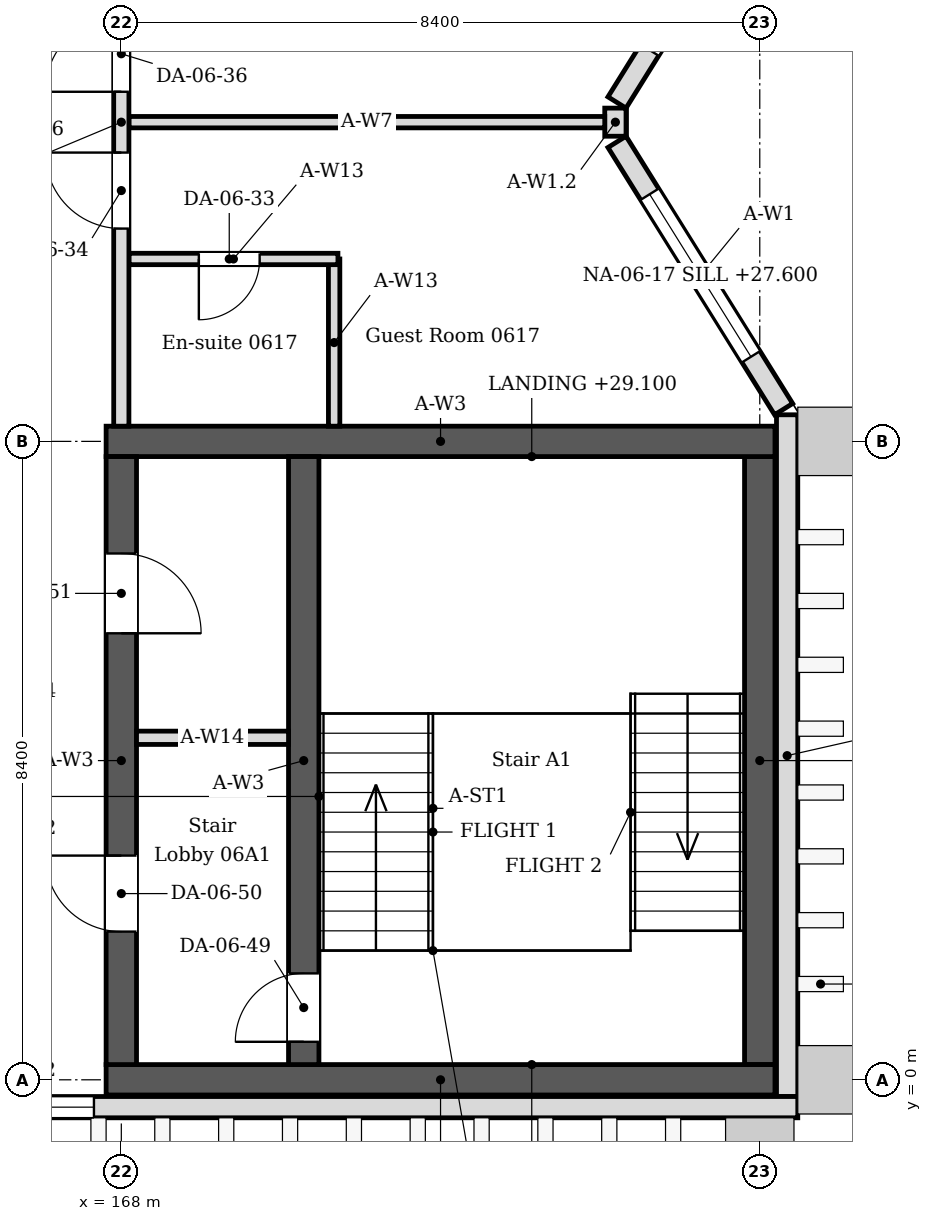
"""IFC4 building model, lengths in metres.
Left out: names, types, materials, properties, quantities, classifications, styles, units other than length and angle.
Written with IfcOpenShell. Run it as: python <this file> out.ifc"""

import sys

from ifc_helpers import new_model, si_unit, direction, frame, frame_2d, origin, place, context, subcontext, project, spatial, rectangle, extrude, element, fill, save


model = new_model("IFC4")
c1 = context("Model", 3, precision=1e-05, world=origin(), true_north=direction((0.0, 1.0)))
c2 = subcontext(c1, "Body", "Model", "MODEL_VIEW")
j1 = project(units=[si_unit("LENGTHUNIT", "METRE"), si_unit("PLANEANGLEUNIT", "RADIAN")], contexts=[c1])
p1 = place(None, origin())
s1 = spatial("IfcSite", under=j1, at=p1, CompositionType="ELEMENT")
p2 = place(p1, origin())
s2 = spatial("IfcBuilding", under=s1, at=p2, CompositionType="ELEMENT")
p3 = place(p2, frame((0.0, 0.0, 27.0)))
s3 = spatial("IfcBuildingStorey", under=s2, at=p3, CompositionType="ELEMENT", Elevation=27.0)
for number, where, z_axis, x_axis in (
    (1, (167.8, 0.0, 0.0), (0.0, 0.0, 1.0), (1.0, 0.0, 0.0)),
    (2, (167.8, 8.4, 0.0), (0.0, 0.0, 1.0), (1.0, 0.0, 0.0)),
):
    element("IfcWall", number, at=place(p3, frame(where, z_axis=z_axis, x_axis=x_axis)), inside=s3, PredefinedType="SOLIDWALL", context=c2, shape_type="SweptSolid", body=[
        extrude(rectangle(XDim=8.8, YDim=0.4, at=frame_2d((4.4, 0.0))), origin(), (0.0, 0.0, 1.0), 4.05),
    ])
p4 = place(p3, frame((168.0, 0.2, 0.0), z_axis=(0.0, 0.0, 1.0), x_axis=(0.0, 1.0, 0.0)))
e3 = element("IfcWall", 3, at=p4, inside=s3, PredefinedType="SOLIDWALL", context=c2, shape_type="SweptSolid", body=[
    extrude(rectangle(XDim=8.0, YDim=0.4, at=frame_2d((4.0, 0.0))), origin(), (0.0, 0.0, 1.0), 4.05),
])
p5 = place(p4, frame((1.75, 0.0, 0.0)))
e4 = element("IfcOpeningElement", 4, at=p5, cuts=e3, PredefinedType="OPENING", context=c2, shape_type="SweptSolid", body=[
    extrude(rectangle(XDim=1.0, YDim=2.1, at=frame_2d((0.5, 1.05))), frame((0.0, 0.21, 0.0), z_axis=(0.0, -1.0, 0.0), x_axis=(1.0, 0.0, 0.0)), (0.0, 0.0, 1.0), 0.42),
])
p6 = place(p4, frame((5.675, 0.0, 0.0)))
e5 = element("IfcOpeningElement", 5, at=p6, cuts=e3, PredefinedType="OPENING", context=c2, shape_type="SweptSolid", body=[
    extrude(rectangle(XDim=1.05, YDim=2.1, at=frame_2d((0.525, 1.05))), frame((0.0, 0.21, 0.0), z_axis=(0.0, -1.0, 0.0), x_axis=(1.0, 0.0, 0.0)), (0.0, 0.0, 1.0), 0.42),
])
p7 = place(p3, frame((176.4, 0.2, 0.0), z_axis=(0.0, 0.0, 1.0), x_axis=(0.0, 1.0, 0.0)))
e6 = element("IfcWall", 6, at=p7, inside=s3, PredefinedType="SOLIDWALL", context=c2, shape_type="SweptSolid", body=[
    extrude(rectangle(XDim=8.0, YDim=0.4, at=frame_2d((4.0, 0.0))), origin(), (0.0, 0.0, 1.0), 4.05),
])
p8 = place(p3, frame((176.76, -0.22, 0.0), z_axis=(0.0, 0.0, 1.0), x_axis=(0.0, 1.0, 0.0)))
e7 = element("IfcWall", 7, at=p8, inside=s3, PredefinedType="SOLIDWALL", context=c2, shape_type="SweptSolid", body=[
    extrude(rectangle(XDim=8.97, YDim=0.28, at=frame_2d((4.485, 0.0))), origin(), (0.0, 0.0, 1.0), 4.05),
])
p9 = place(p3, frame((176.714, 8.824, 0.0), z_axis=(0.0, 0.0, 1.0), x_axis=(-0.529018946142, 0.848610013271, 0.0)))
e8 = element("IfcWall", 8, at=p9, inside=s3, PredefinedType="SOLIDWALL", context=c2, shape_type="SweptSolid", body=[
    extrude(rectangle(XDim=4.144, YDim=0.28, at=frame_2d((2.072, 0.0))), origin(), (0.0, 0.0, 1.0), 4.05),
])
p10 = place(p9, frame((0.812, 0.0, 0.6)))
e9 = element("IfcOpeningElement", 9, at=p10, cuts=e8, PredefinedType="OPENING", context=c2, shape_type="SweptSolid", body=[
    extrude(rectangle(XDim=2.52, YDim=2.4, at=frame_2d((1.26, 1.2))), frame((0.0, 0.15, 0.0), z_axis=(0.0, -1.0, 0.0), x_axis=(1.0, 0.0, 0.0)), (0.0, 0.0, 1.0), 0.3),
])
p11 = place(p3, frame((174.521, 12.859, 0.0), z_axis=(0.0, 0.0, 1.0), x_axis=(0.528992500338, 0.848626498871, 0.0)))
e10 = element("IfcWall", 10, at=p11, inside=s3, PredefinedType="SOLIDWALL", context=c2, shape_type="SweptSolid", body=[
    extrude(rectangle(XDim=4.145, YDim=0.28, at=frame_2d((2.072, 0.0))), origin(), (0.0, 0.0, 1.0), 4.05),
])
p12 = place(p11, frame((0.812, 0.0, 0.6)))
e11 = element("IfcOpeningElement", 11, at=p12, cuts=e10, PredefinedType="OPENING", context=c2, shape_type="SweptSolid", body=[
    extrude(rectangle(XDim=2.52, YDim=2.4, at=frame_2d((1.26, 1.2))), frame((0.0, 0.15, 0.0), z_axis=(0.0, -1.0, 0.0), x_axis=(1.0, 0.0, 0.0)), (0.0, 0.0, 1.0), 0.3),
])
p13 = place(p3, frame((174.5, 12.415, 0.0), z_axis=(0.0, 0.0, 1.0), x_axis=(0.0, 1.0, 0.0)))
e12 = element("IfcWall", 12, at=p13, inside=s3, PredefinedType="SOLIDWALL", context=c2, shape_type="SweptSolid", body=[
    extrude(rectangle(XDim=0.37, YDim=0.28, at=frame_2d((0.185, 0.0))), origin(), (0.0, 0.0, 1.0), 3.604),
])
p14 = place(p3, frame((156.7, -0.36, 0.0), z_axis=(0.0, 0.0, 1.0), x_axis=(1.0, 0.0, 0.0)))
e13 = element("IfcWall", 13, at=p14, inside=s3, PredefinedType="SOLIDWALL", context=c2, shape_type="SweptSolid", body=[
    extrude(rectangle(XDim=20.2, YDim=0.28, at=frame_2d((10.1, 0.0))), origin(), (0.0, 0.0, 1.0), 4.05),
])
p15 = place(p14, frame((9.26, 0.0, 0.6)))
e14 = element("IfcOpeningElement", 14, at=p15, cuts=e13, PredefinedType="OPENING", context=c2, shape_type="SweptSolid", body=[
    extrude(rectangle(XDim=1.68, YDim=2.4, at=frame_2d((0.84, 1.2))), frame((0.0, 0.15, 0.0), z_axis=(0.0, -1.0, 0.0), x_axis=(1.0, 0.0, 0.0)), (0.0, 0.0, 1.0), 0.3),
])
p16 = place(p14, frame((3.34, 0.0, 0.6)))
e15 = element("IfcOpeningElement", 15, at=p16, cuts=e13, PredefinedType="OPENING", context=c2, shape_type="SweptSolid", body=[
    extrude(rectangle(XDim=2.52, YDim=2.4, at=frame_2d((1.26, 1.2))), frame((0.0, 0.15, 0.0), z_axis=(0.0, -1.0, 0.0), x_axis=(1.0, 0.0, 0.0)), (0.0, 0.0, 1.0), 0.3),
])
p17 = place(p3, frame((170.8, 8.6, 0.0), z_axis=(0.0, 0.0, 1.0), x_axis=(0.0, 1.0, 0.0)))
e16 = element("IfcWall", 16, at=p17, inside=s3, PredefinedType="PARTITIONING", context=c2, shape_type="SweptSolid", body=[
    extrude(rectangle(XDim=2.2, YDim=0.15, at=frame_2d((1.1, 0.0))), origin(), (0.0, 0.0, 1.0), 4.05),
])
p18 = place(p3, frame((170.85, 10.8, 0.0), z_axis=(0.0, 0.0, 1.0), x_axis=(-1.0, 0.0, 0.0)))
e17 = element("IfcWall", 17, at=p18, inside=s3, PredefinedType="PARTITIONING", context=c2, shape_type="SweptSolid", body=[
    extrude(rectangle(XDim=2.75, YDim=0.15, at=frame_2d((1.375, 0.0))), origin(), (0.0, 0.0, 1.0), 4.05),
])
p19 = place(p18, frame((1.03, 0.0, 0.0)))
e18 = element("IfcOpeningElement", 18, at=p19, cuts=e17, PredefinedType="OPENING", context=c2, shape_type="SweptSolid", body=[
    extrude(rectangle(XDim=0.8, YDim=2.1, at=frame_2d((0.4, 1.05))), frame((0.0, 0.085, 0.0), z_axis=(0.0, -1.0, 0.0), x_axis=(1.0, 0.0, 0.0)), (0.0, 0.0, 1.0), 0.17),
])
p20 = place(p3, frame((168.1, 12.6, 0.0), z_axis=(0.0, 0.0, 1.0), x_axis=(1.0, 0.0, 0.0)))
e19 = element("IfcWall", 19, at=p20, inside=s3, PredefinedType="PARTITIONING", context=c2, shape_type="SweptSolid", body=[
    extrude(rectangle(XDim=6.26, YDim=0.15, at=frame_2d((3.13, 0.0))), origin(), (0.0, 0.0, 1.0), 3.604),
])
p21 = place(p3, frame((168.0, 8.6, 0.0), z_axis=(0.0, 0.0, 1.0), x_axis=(0.0, 1.0, 0.0)))
e20 = element("IfcWall", 20, at=p21, inside=s3, PredefinedType="PARTITIONING", context=c2, shape_type="SweptSolid", body=[
    extrude(rectangle(XDim=8.0, YDim=0.2, at=frame_2d((4.0, 0.0))), origin(), (0.0, 0.0, 1.0), 3.45),
])
p22 = place(p21, frame((2.6, 0.0, 0.0)))
e21 = element("IfcOpeningElement", 21, at=p22, cuts=e20, PredefinedType="OPENING", context=c2, shape_type="SweptSolid", body=[
    extrude(rectangle(XDim=1.0, YDim=2.4, at=frame_2d((0.5, 1.2))), frame((0.0, 0.11, 0.0), z_axis=(0.0, -1.0, 0.0), x_axis=(1.0, 0.0, 0.0)), (0.0, 0.0, 1.0), 0.22),
])
p23 = place(p21, frame((4.4, 0.0, 0.0)))
e22 = element("IfcOpeningElement", 22, at=p23, cuts=e20, PredefinedType="OPENING", context=c2, shape_type="SweptSolid", body=[
    extrude(rectangle(XDim=1.0, YDim=2.4, at=frame_2d((0.5, 1.2))), frame((0.0, 0.11, 0.0), z_axis=(0.0, -1.0, 0.0), x_axis=(1.0, 0.0, 0.0)), (0.0, 0.0, 1.0), 0.22),
])
p24 = place(p3, frame((170.4, 0.2, 0.0), z_axis=(0.0, 0.0, 1.0), x_axis=(0.0, 1.0, 0.0)))
e23 = element("IfcWall", 23, at=p24, inside=s3, PredefinedType="SOLIDWALL", context=c2, shape_type="SweptSolid", body=[
    extrude(rectangle(XDim=8.0, YDim=0.4, at=frame_2d((4.0, 0.0))), origin(), (0.0, 0.0, 1.0), 4.05),
])
p25 = place(p24, frame((0.3, 0.0, 0.0)))
e24 = element("IfcOpeningElement", 24, at=p25, cuts=e23, PredefinedType="OPENING", context=c2, shape_type="SweptSolid", body=[
    extrude(rectangle(XDim=0.9, YDim=2.1, at=frame_2d((0.45, 1.05))), frame((0.0, 0.21, 0.0), z_axis=(0.0, -1.0, 0.0), x_axis=(1.0, 0.0, 0.0)), (0.0, 0.0, 1.0), 0.42),
])
p26 = place(p3, frame((168.2, 4.5, 0.0), z_axis=(0.0, 0.0, 1.0), x_axis=(1.0, 0.0, 0.0)))
e25 = element("IfcWall", 25, at=p26, inside=s3, PredefinedType="PARTITIONING", context=c2, shape_type="SweptSolid", body=[
    extrude(rectangle(XDim=2.0, YDim=0.175, at=frame_2d((1.0, 0.0))), origin(), (0.0, 0.0, 1.0), 4.05),
])
p27 = place(p10, origin())
e26 = element("IfcWindow", 26, at=p27, inside=s3, PartitioningType="SINGLE_PANEL", PredefinedType="WINDOW", context=c2, shape_type="SweptSolid", body=[
    extrude(rectangle(XDim=2.52, YDim=2.4, at=frame_2d((1.26, 1.2))), frame((0.0, 0.03, 0.0), z_axis=(0.0, -1.0, 0.0), x_axis=(1.0, 0.0, 0.0)), (0.0, 0.0, 1.0), 0.06),
])
fill(e9, e26)
p28 = place(p15, origin())
e27 = element("IfcWindow", 27, at=p28, inside=s3, PartitioningType="SINGLE_PANEL", PredefinedType="WINDOW", context=c2, shape_type="SweptSolid", body=[
    extrude(rectangle(XDim=1.68, YDim=2.4, at=frame_2d((0.84, 1.2))), frame((0.0, 0.03, 0.0), z_axis=(0.0, -1.0, 0.0), x_axis=(1.0, 0.0, 0.0)), (0.0, 0.0, 1.0), 0.06),
])
fill(e14, e27)
p29 = place(p19, origin())
e28 = element("IfcDoor", 28, at=p29, inside=s3, OperationType="SINGLE_SWING_RIGHT", PredefinedType="DOOR", context=c2, shape_type="SweptSolid", body=[
    extrude(rectangle(XDim=0.8, YDim=2.1, at=frame_2d((0.4, 1.05))), frame((0.0, 0.025, 0.0), z_axis=(0.0, -1.0, 0.0), x_axis=(1.0, 0.0, 0.0)), (0.0, 0.0, 1.0), 0.05),
])
fill(e18, e28)
p30 = place(p22, origin())
e29 = element("IfcDoor", 29, at=p30, inside=s3, OperationType="SINGLE_SWING_RIGHT", PredefinedType="DOOR", context=c2, shape_type="SweptSolid", body=[
    extrude(rectangle(XDim=1.0, YDim=2.4, at=frame_2d((0.5, 1.2))), frame((0.0, 0.025, 0.0), z_axis=(0.0, -1.0, 0.0), x_axis=(1.0, 0.0, 0.0)), (0.0, 0.0, 1.0), 0.05),
])
fill(e21, e29)
p31 = place(p23, origin())
e30 = element("IfcDoor", 30, at=p31, inside=s3, OperationType="SINGLE_SWING_LEFT", PredefinedType="DOOR", context=c2, shape_type="SweptSolid", body=[
    extrude(rectangle(XDim=1.0, YDim=2.4, at=frame_2d((0.5, 1.2))), frame((0.0, 0.025, 0.0), z_axis=(0.0, -1.0, 0.0), x_axis=(1.0, 0.0, 0.0)), (0.0, 0.0, 1.0), 0.05),
])
fill(e22, e30)
p32 = place(p25, origin())
e31 = element("IfcDoor", 31, at=p32, inside=s3, OperationType="SINGLE_SWING_LEFT", PredefinedType="DOOR", context=c2, shape_type="SweptSolid", body=[
    extrude(rectangle(XDim=0.9, YDim=2.1, at=frame_2d((0.45, 1.05))), frame((0.0, 0.025, 0.0), z_axis=(0.0, -1.0, 0.0), x_axis=(1.0, 0.0, 0.0)), (0.0, 0.0, 1.0), 0.05),
])
fill(e24, e31)
p33 = place(p5, origin())
e32 = element("IfcDoor", 32, at=p33, inside=s3, OperationType="SINGLE_SWING_RIGHT", PredefinedType="DOOR", context=c2, shape_type="SweptSolid", body=[
    extrude(rectangle(XDim=1.0, YDim=2.1, at=frame_2d((0.5, 1.05))), frame((0.0, 0.025, 0.0), z_axis=(0.0, -1.0, 0.0), x_axis=(1.0, 0.0, 0.0)), (0.0, 0.0, 1.0), 0.05),
])
fill(e4, e32)
p34 = place(p6, origin())
e33 = element("IfcDoor", 33, at=p34, inside=s3, OperationType="SINGLE_SWING_LEFT", PredefinedType="DOOR", context=c2, shape_type="SweptSolid", body=[
    extrude(rectangle(XDim=1.05, YDim=2.1, at=frame_2d((0.525, 1.05))), frame((0.0, 0.025, 0.0), z_axis=(0.0, -1.0, 0.0), x_axis=(1.0, 0.0, 0.0)), (0.0, 0.0, 1.0), 0.05),
])
fill(e5, e33)
save(model, sys.argv[1])
